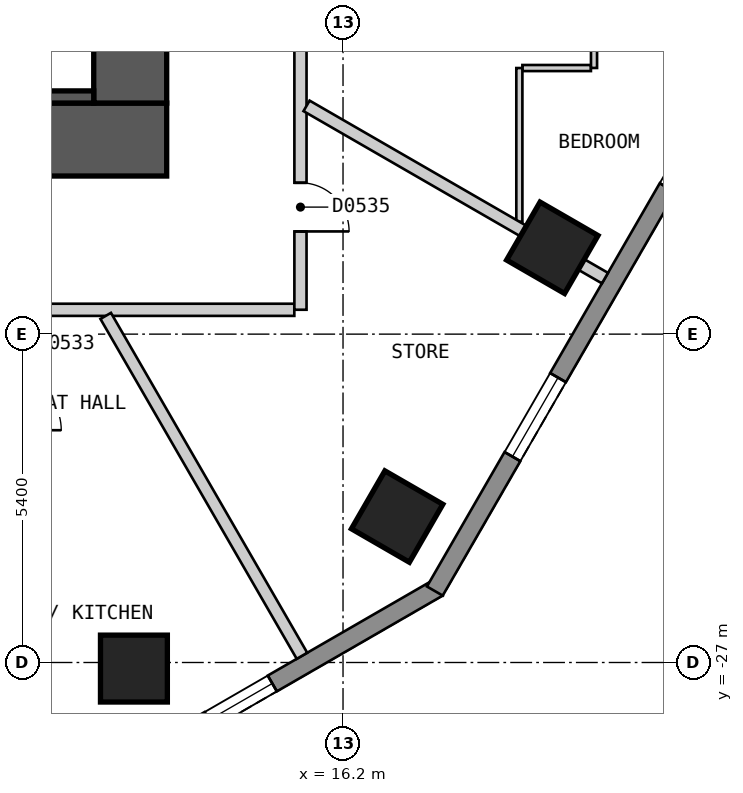
"""IFC4 building model, lengths in metres.
Left out: names, types, materials, properties, quantities, classifications, styles, units other than length and angle.
Written with IfcOpenShell. Run it as: python <this file> out.ifc"""

import sys

from ifc_helpers import new_model, si_unit, direction, frame, frame_2d, origin, origin_2d, place, context, subcontext, project, spatial, polyline, rectangle, outline, extrude, element, fill, save


model = new_model("IFC4")
c1 = context("Model", 3, precision=1e-05, world=origin(), true_north=direction((0.0, 1.0)))
c2 = subcontext(c1, "Body", "Model", "MODEL_VIEW")
j1 = project(units=[si_unit("LENGTHUNIT", "METRE"), si_unit("PLANEANGLEUNIT", "RADIAN")], contexts=[c1])
p1 = place(None, origin())
s1 = spatial("IfcSite", under=j1, at=p1, CompositionType="ELEMENT")
p2 = place(p1, origin())
s2 = spatial("IfcBuilding", under=s1, at=p2, CompositionType="ELEMENT")
p3 = place(p2, frame((0.0, 0.0, 44.4)))
s3 = spatial("IfcBuildingStorey", under=s2, at=p3, CompositionType="ELEMENT", Elevation=44.4)
for number, where, z_axis, x_axis in (
    (1, (12.761, -27.1, 0.0), (0.0, 0.0, 1.0), (1.0, 0.0, 0.0)),
    (2, (17.09, -24.6, 0.0), (0.0, 0.0, 1.0), (0.5, 0.866, 0.0)),
    (3, (19.642, -20.18, 0.0), (0.0, 0.0, 1.0), (0.5, 0.866, 0.0)),
):
    element("IfcColumn", number, at=place(p3, frame(where, z_axis=z_axis, x_axis=x_axis)), inside=s3, PredefinedType="COLUMN", context=c2, shape_type="SweptSolid", body=[
        extrude(rectangle(XDim=1.1, YDim=1.1, at=origin_2d()), origin(), (0.0, 0.0, 1.0), 3.0),
    ])
p4 = place(p3, frame((-13.3, -18.4, 0.0), z_axis=(0.0, 0.0, 1.0), x_axis=(1.0, 0.0, 0.0)))
e4 = element("IfcWall", 4, at=p4, inside=s3, PredefinedType="SHEAR", context=c2, shape_type="SweptSolid", body=[
    extrude(rectangle(XDim=26.6, YDim=1.2, at=frame_2d((13.3, 0.0))), origin(), (0.0, 0.0, 1.0), 2.7),
])
p5 = place(p3, frame((12.7, -17.8, 0.0), z_axis=(0.0, 0.0, 1.0), x_axis=(0.0, 1.0, 0.0)))
e5 = element("IfcWall", 5, at=p5, inside=s3, PredefinedType="SHEAR", context=c2, shape_type="SweptSolid", body=[
    extrude(rectangle(XDim=11.6, YDim=1.2, at=frame_2d((5.8, 0.0))), origin(), (0.0, 0.0, 1.0), 2.7),
])
p6 = place(p3, frame((13.435, -28.27, 0.0), z_axis=(0.0, 0.0, 1.0), x_axis=(0.866010750942, 0.50002537861, 0.0)))
e6 = element("IfcWall", 6, at=p6, inside=s3, PredefinedType="SOLIDWALL", context=c2, shape_type="SweptSolid", body=[
    extrude(outline(polyline([(0.0, -0.15), (5.0, -0.15), (4.919, 0.15), (0.08, 0.15), (0.0, -0.15)])), origin(), (0.0, 0.0, 1.0), 2.7),
])
p7 = place(p6, frame((0.65, 0.0, 0.15)))
e7 = element("IfcOpeningElement", 7, at=p7, cuts=e6, PredefinedType="OPENING", context=c2, shape_type="SweptSolid", body=[
    extrude(rectangle(XDim=1.2, YDim=2.1, at=frame_2d((0.6, 1.05))), frame((0.0, 0.16, 0.0), z_axis=(0.0, -1.0, 0.0), x_axis=(1.0, 0.0, 0.0)), (0.0, 0.0, 1.0), 0.32),
])
p8 = place(p3, frame((17.71, -25.825, 0.0), z_axis=(0.0, 0.0, 1.0), x_axis=(0.500001938803, 0.866024284413, 0.0)))
e8 = element("IfcWall", 8, at=p8, inside=s3, PredefinedType="SOLIDWALL", context=c2, shape_type="SweptSolid", body=[
    extrude(outline(polyline([(0.0, -0.15), (27.02, -0.15), (26.94, 0.15), (0.08, 0.15), (0.0, -0.15)])), origin(), (0.0, 0.0, 1.0), 2.7),
])
p9 = place(p8, frame((2.553, 0.0, 0.15)))
e9 = element("IfcOpeningElement", 9, at=p9, cuts=e8, PredefinedType="OPENING", context=c2, shape_type="SweptSolid", body=[
    extrude(rectangle(XDim=1.5, YDim=2.1, at=frame_2d((0.75, 1.05))), frame((0.0, 0.16, 0.0), z_axis=(0.0, -1.0, 0.0), x_axis=(1.0, 0.0, 0.0)), (0.0, 0.0, 1.0), 0.32),
])
p10 = place(p8, frame((7.658, 0.0, 0.15)))
e10 = element("IfcOpeningElement", 10, at=p10, cuts=e8, PredefinedType="OPENING", context=c2, shape_type="SweptSolid", body=[
    extrude(rectangle(XDim=1.5, YDim=2.1, at=frame_2d((0.75, 1.05))), frame((0.0, 0.16, 0.0), z_axis=(0.0, -1.0, 0.0), x_axis=(1.0, 0.0, 0.0)), (0.0, 0.0, 1.0), 0.32),
])
p11 = place(p8, frame((12.761, 0.0, 0.15)))
e11 = element("IfcOpeningElement", 11, at=p11, cuts=e8, PredefinedType="OPENING", context=c2, shape_type="SweptSolid", body=[
    extrude(rectangle(XDim=1.5, YDim=2.1, at=frame_2d((0.75, 1.05))), frame((0.0, 0.16, 0.0), z_axis=(0.0, -1.0, 0.0), x_axis=(1.0, 0.0, 0.0)), (0.0, 0.0, 1.0), 0.32),
])
p12 = place(p8, frame((17.865, 0.0, 0.15)))
e12 = element("IfcOpeningElement", 12, at=p12, cuts=e8, PredefinedType="OPENING", context=c2, shape_type="SweptSolid", body=[
    extrude(rectangle(XDim=1.5, YDim=2.1, at=frame_2d((0.75, 1.05))), frame((0.0, 0.16, 0.0), z_axis=(0.0, -1.0, 0.0), x_axis=(1.0, 0.0, 0.0)), (0.0, 0.0, 1.0), 0.32),
])
p13 = place(p8, frame((22.969, 0.0, 0.15)))
e13 = element("IfcOpeningElement", 13, at=p13, cuts=e8, PredefinedType="OPENING", context=c2, shape_type="SweptSolid", body=[
    extrude(rectangle(XDim=1.5, YDim=2.1, at=frame_2d((0.75, 1.05))), frame((0.0, 0.16, 0.0), z_axis=(0.0, -1.0, 0.0), x_axis=(1.0, 0.0, 0.0)), (0.0, 0.0, 1.0), 0.32),
])
p14 = place(p3, frame((-15.4, -21.2, 0.0), z_axis=(0.0, 0.0, 1.0), x_axis=(1.0, 0.0, 0.0)))
e14 = element("IfcWall", 14, at=p14, inside=s3, PredefinedType="PARTITIONING", context=c2, shape_type="SweptSolid", body=[
    extrude(rectangle(XDim=30.799, YDim=0.2, at=frame_2d((15.399, 0.0))), origin(), (0.0, 0.0, 1.0), 2.7),
])
p15 = place(p14, frame((4.985, 0.0, 0.0)))
e15 = element("IfcOpeningElement", 15, at=p15, cuts=e14, PredefinedType="OPENING", context=c2, shape_type="SweptSolid", body=[
    extrude(rectangle(XDim=0.9, YDim=2.1, at=frame_2d((0.45, 1.05))), frame((0.0, 0.11, 0.0), z_axis=(0.0, -1.0, 0.0), x_axis=(1.0, 0.0, 0.0)), (0.0, 0.0, 1.0), 0.22),
])
p16 = place(p14, frame((20.005, 0.0, 0.0)))
e16 = element("IfcOpeningElement", 16, at=p16, cuts=e14, PredefinedType="OPENING", context=c2, shape_type="SweptSolid", body=[
    extrude(rectangle(XDim=1.0, YDim=2.1, at=frame_2d((0.5, 1.05))), frame((0.0, 0.11, 0.0), z_axis=(0.0, -1.0, 0.0), x_axis=(1.0, 0.0, 0.0)), (0.0, 0.0, 1.0), 0.22),
])
p17 = place(p14, frame((24.916, 0.0, 0.0)))
e17 = element("IfcOpeningElement", 17, at=p17, cuts=e14, PredefinedType="OPENING", context=c2, shape_type="SweptSolid", body=[
    extrude(rectangle(XDim=0.9, YDim=2.1, at=frame_2d((0.45, 1.05))), frame((0.0, 0.11, 0.0), z_axis=(0.0, -1.0, 0.0), x_axis=(1.0, 0.0, 0.0)), (0.0, 0.0, 1.0), 0.22),
])
p18 = place(p3, frame((15.5, -21.199, 0.0), z_axis=(0.0, 0.0, 1.0), x_axis=(0.0, 1.0, 0.0)))
e18 = element("IfcWall", 18, at=p18, inside=s3, PredefinedType="PARTITIONING", context=c2, shape_type="SweptSolid", body=[
    extrude(rectangle(XDim=7.575, YDim=0.2, at=frame_2d((3.788, 0.0))), origin(), (0.0, 0.0, 1.0), 2.7),
])
p19 = place(p18, frame((1.288, 0.0, 0.0)))
e19 = element("IfcOpeningElement", 19, at=p19, cuts=e18, PredefinedType="OPENING", context=c2, shape_type="SweptSolid", body=[
    extrude(rectangle(XDim=0.8, YDim=2.1, at=frame_2d((0.4, 1.05))), frame((0.0, 0.11, 0.0), z_axis=(0.0, -1.0, 0.0), x_axis=(1.0, 0.0, 0.0)), (0.0, 0.0, 1.0), 0.22),
])
p20 = place(p3, frame((19.15, -17.224, 0.0), z_axis=(0.0, 0.0, 1.0), x_axis=(1.0, 0.0, 0.0)))
e20 = element("IfcWall", 20, at=p20, inside=s3, PredefinedType="PARTITIONING", context=c2, shape_type="SweptSolid", body=[
    extrude(rectangle(XDim=1.127, YDim=0.1, at=frame_2d((0.563, 0.0))), origin(), (0.0, 0.0, 1.0), 2.7),
])
p21 = place(p3, frame((19.1, -19.751, 0.0), z_axis=(0.0, 0.0, 1.0), x_axis=(0.0, 1.0, 0.0)))
e21 = element("IfcWall", 21, at=p21, inside=s3, PredefinedType="PARTITIONING", context=c2, shape_type="SweptSolid", body=[
    extrude(rectangle(XDim=2.527, YDim=0.1, at=frame_2d((1.263, 0.0))), origin(), (0.0, 0.0, 1.0), 2.7),
])
p22 = place(p3, frame((20.328, -17.223, 0.0), z_axis=(0.0, 0.0, 1.0), x_axis=(0.0, 1.0, 0.0)))
e22 = element("IfcWall", 22, at=p22, inside=s3, PredefinedType="PARTITIONING", context=c2, shape_type="SweptSolid", body=[
    extrude(rectangle(XDim=8.376, YDim=0.1, at=frame_2d((4.188, 0.0))), origin(), (0.0, 0.0, 1.0), 2.7),
])
p23 = place(p22, frame((0.37, 0.0, 0.0)))
e23 = element("IfcOpeningElement", 23, at=p23, cuts=e22, PredefinedType="OPENING", context=c2, shape_type="SweptSolid", body=[
    extrude(rectangle(XDim=0.8, YDim=2.1, at=frame_2d((0.4, 1.05))), frame((0.0, 0.06, 0.0), z_axis=(0.0, -1.0, 0.0), x_axis=(1.0, 0.0, 0.0)), (0.0, 0.0, 1.0), 0.12),
])
p24 = place(p3, frame((12.297, -21.3, 0.0), z_axis=(0.0, 0.0, 1.0), x_axis=(0.500056399578, -0.865992839024, 0.0)))
e24 = element("IfcWall", 24, at=p24, inside=s3, PredefinedType="PARTITIONING", context=c2, shape_type="SweptSolid", body=[
    extrude(rectangle(XDim=6.455, YDim=0.2, at=frame_2d((3.228, 0.0))), origin(), (0.0, 0.0, 1.0), 2.7),
])
p25 = place(p3, frame((15.6, -17.846, 0.0), z_axis=(0.0, 0.0, 1.0), x_axis=(0.866071523686, -0.499920109479, 0.0)))
e25 = element("IfcWall", 25, at=p25, inside=s3, PredefinedType="PARTITIONING", context=c2, shape_type="SweptSolid", body=[
    extrude(rectangle(XDim=5.667, YDim=0.2, at=frame_2d((2.833, 0.0))), origin(), (0.0, 0.0, 1.0), 2.7),
])
p26 = place(p3, frame((6.7, -17.7, 0.0), z_axis=(0.0, 0.0, 1.0), x_axis=(1.0, 0.0, 0.0)))
e26 = element("IfcWall", 26, at=p26, inside=s3, PredefinedType="SOLIDWALL", context=c2, shape_type="SweptSolid", body=[
    extrude(rectangle(XDim=5.4, YDim=0.2, at=frame_2d((2.7, 0.0))), origin(), (0.0, 0.0, 1.0), 2.7),
])
p27 = place(p7, origin())
e27 = element("IfcWindow", 27, at=p27, inside=s3, PartitioningType="SINGLE_PANEL", PredefinedType="WINDOW", context=c2, shape_type="SweptSolid", body=[
    extrude(rectangle(XDim=1.2, YDim=2.1, at=frame_2d((0.6, 1.05))), frame((0.0, 0.03, 0.0), z_axis=(0.0, -1.0, 0.0), x_axis=(1.0, 0.0, 0.0)), (0.0, 0.0, 1.0), 0.06),
])
fill(e7, e27)
p28 = place(p9, origin())
e28 = element("IfcWindow", 28, at=p28, inside=s3, PartitioningType="SINGLE_PANEL", PredefinedType="WINDOW", context=c2, shape_type="SweptSolid", body=[
    extrude(rectangle(XDim=1.5, YDim=2.1, at=frame_2d((0.75, 1.05))), frame((0.0, 0.03, 0.0), z_axis=(0.0, -1.0, 0.0), x_axis=(1.0, 0.0, 0.0)), (0.0, 0.0, 1.0), 0.06),
])
fill(e9, e28)
p29 = place(p19, origin())
e29 = element("IfcDoor", 29, at=p29, inside=s3, OperationType="SINGLE_SWING_LEFT", PredefinedType="DOOR", context=c2, shape_type="SweptSolid", body=[
    extrude(rectangle(XDim=0.8, YDim=2.1, at=frame_2d((0.4, 1.05))), frame((0.0, 0.025, 0.0), z_axis=(0.0, -1.0, 0.0), x_axis=(1.0, 0.0, 0.0)), (0.0, 0.0, 1.0), 0.05),
])
fill(e19, e29)
save(model, sys.argv[1])
